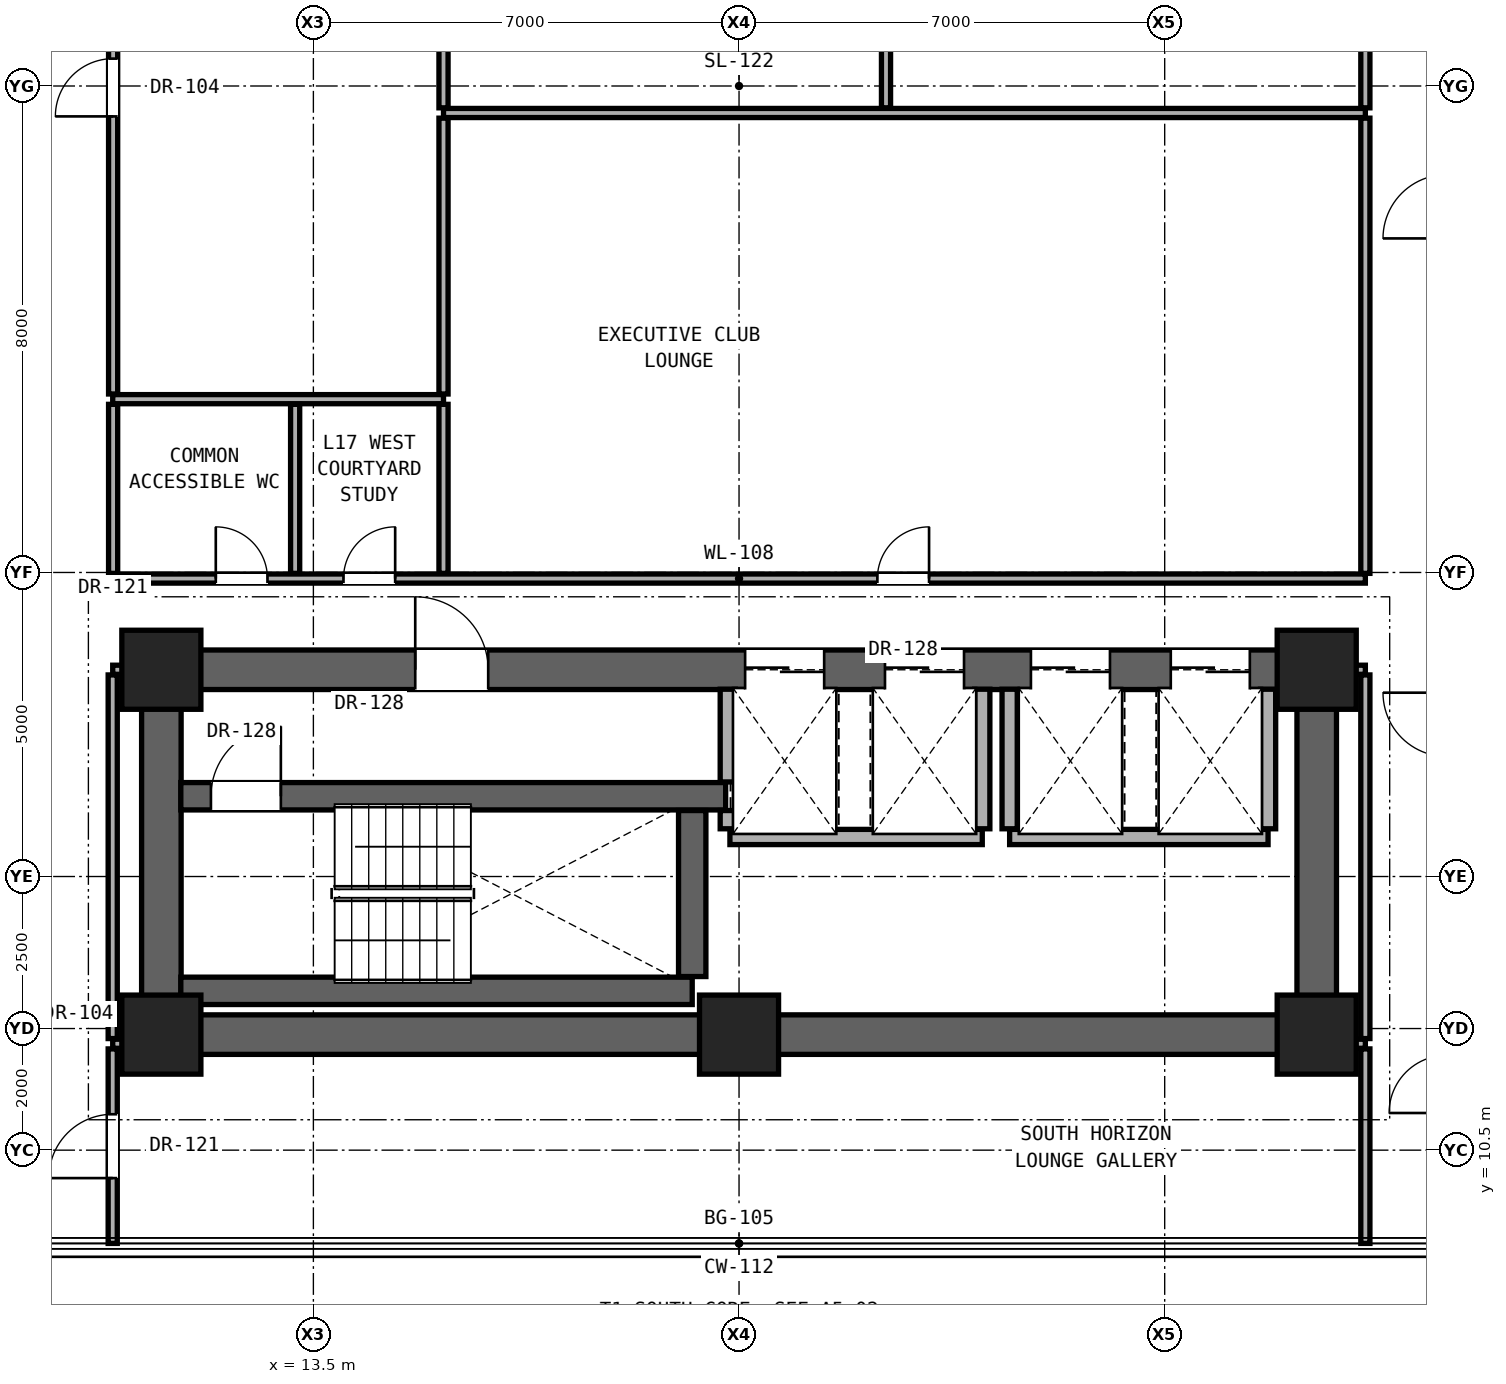
"""IFC4 building model, lengths in metres.
Left out: names, types, materials, properties, quantities, classifications, styles, units other than length and angle.
Written with IfcOpenShell. Run it as: python <this file> out.ifc"""

import sys

from ifc_helpers import new_model, si_unit, direction, frame, frame_2d, origin, origin_2d, place, context, subcontext, project, spatial, rectangle, extrude, element, fill, save


model = new_model("IFC4")
c1 = context("Model", 3, precision=1e-05, world=origin(), true_north=direction((0.0, 1.0)))
c2 = subcontext(c1, "Body", "Model", "MODEL_VIEW")
j1 = project(units=[si_unit("LENGTHUNIT", "METRE"), si_unit("PLANEANGLEUNIT", "RADIAN")], contexts=[c1])
p1 = place(None, origin())
s1 = spatial("IfcSite", under=j1, at=p1, CompositionType="ELEMENT")
p2 = place(p1, origin())
s2 = spatial("IfcBuilding", under=s1, at=p2, CompositionType="ELEMENT")
p3 = place(p2, frame((0.0, 0.0, 62.0)))
s3 = spatial("IfcBuildingStorey", under=s2, at=p3, CompositionType="ELEMENT", Elevation=62.0)
for number, where, z_axis, x_axis in (
    (1, (11.0, 12.4, 0.0), (0.0, 0.0, 1.0), (1.0, 0.0, 0.0)),
    (2, (20.5, 12.4, 0.0), (0.0, 0.0, 1.0), (1.0, 0.0, 0.0)),
    (3, (30.0, 12.4, 0.0), (0.0, 0.0, 1.0), (1.0, 0.0, 0.0)),
    (4, (11.0, 18.4, 0.0), (0.0, 0.0, 1.0), (1.0, 0.0, 0.0)),
    (5, (30.0, 18.4, 0.0), (0.0, 0.0, 1.0), (1.0, 0.0, 0.0)),
):
    element("IfcColumn", number, at=place(p3, frame(where, z_axis=z_axis, x_axis=x_axis)), inside=s3, PredefinedType="COLUMN", context=c2, shape_type="SweptSolid", body=[
        extrude(rectangle(XDim=1.3, YDim=1.3, at=origin_2d()), origin(), (0.0, 0.0, 1.0), 3.3),
    ])
p4 = place(p3, frame((11.0, 12.4, 0.0), z_axis=(0.0, 0.0, 1.0), x_axis=(1.0, 0.0, 0.0)))
e6 = element("IfcWall", 6, at=p4, inside=s3, PredefinedType="SHEAR", context=c2, shape_type="SweptSolid", body=[
    extrude(rectangle(XDim=19.0, YDim=0.65, at=frame_2d((9.5, 0.0))), origin(), (0.0, 0.0, 1.0), 3.06),
])
for number, where, z_axis, x_axis in (
    (7, (11.0, 12.4, 0.0), (0.0, 0.0, 1.0), (0.0, 1.0, 0.0)),
    (8, (30.0, 12.4, 0.0), (0.0, 0.0, 1.0), (0.0, 1.0, 0.0)),
):
    element("IfcWall", number, at=place(p3, frame(where, z_axis=z_axis, x_axis=x_axis)), inside=s3, PredefinedType="SHEAR", context=c2, shape_type="SweptSolid", body=[
        extrude(rectangle(XDim=6.0, YDim=0.65, at=frame_2d((3.0, 0.0))), origin(), (0.0, 0.0, 1.0), 3.06),
    ])
p5 = place(p3, frame((11.0, 18.4, 0.0), z_axis=(0.0, 0.0, 1.0), x_axis=(1.0, 0.0, 0.0)))
e9 = element("IfcWall", 9, at=p5, inside=s3, PredefinedType="SHEAR", context=c2, shape_type="SweptSolid", body=[
    extrude(rectangle(XDim=19.0, YDim=0.65, at=frame_2d((9.5, 0.0))), origin(), (0.0, 0.0, 1.0), 3.06),
])
p6 = place(p5, frame((4.175, 0.0, 0.0)))
e10 = element("IfcOpeningElement", 10, at=p6, cuts=e9, PredefinedType="OPENING", context=c2, shape_type="SweptSolid", body=[
    extrude(rectangle(XDim=1.2, YDim=2.25, at=frame_2d((0.6, 1.125))), frame((0.0, 0.335, 0.0), z_axis=(0.0, -1.0, 0.0), x_axis=(1.0, 0.0, 0.0)), (0.0, 0.0, 1.0), 0.67),
])
p7 = place(p5, frame((9.6, 0.0, 0.0)))
e11 = element("IfcOpeningElement", 11, at=p7, cuts=e9, PredefinedType="OPENING", context=c2, shape_type="SweptSolid", body=[
    extrude(rectangle(XDim=1.3, YDim=2.3, at=frame_2d((0.65, 1.15))), frame((0.0, 0.335, 0.0), z_axis=(0.0, -1.0, 0.0), x_axis=(1.0, 0.0, 0.0)), (0.0, 0.0, 1.0), 0.67),
])
p8 = place(p5, frame((11.9, 0.0, 0.0)))
e12 = element("IfcOpeningElement", 12, at=p8, cuts=e9, PredefinedType="OPENING", context=c2, shape_type="SweptSolid", body=[
    extrude(rectangle(XDim=1.3, YDim=2.3, at=frame_2d((0.65, 1.15))), frame((0.0, 0.335, 0.0), z_axis=(0.0, -1.0, 0.0), x_axis=(1.0, 0.0, 0.0)), (0.0, 0.0, 1.0), 0.67),
])
p9 = place(p5, frame((14.3, 0.0, 0.0)))
e13 = element("IfcOpeningElement", 13, at=p9, cuts=e9, PredefinedType="OPENING", context=c2, shape_type="SweptSolid", body=[
    extrude(rectangle(XDim=1.3, YDim=2.3, at=frame_2d((0.65, 1.15))), frame((0.0, 0.335, 0.0), z_axis=(0.0, -1.0, 0.0), x_axis=(1.0, 0.0, 0.0)), (0.0, 0.0, 1.0), 0.67),
])
p10 = place(p5, frame((16.6, 0.0, 0.0)))
e14 = element("IfcOpeningElement", 14, at=p10, cuts=e9, PredefinedType="OPENING", context=c2, shape_type="SweptSolid", body=[
    extrude(rectangle(XDim=1.3, YDim=2.3, at=frame_2d((0.65, 1.15))), frame((0.0, 0.335, 0.0), z_axis=(0.0, -1.0, 0.0), x_axis=(1.0, 0.0, 0.0)), (0.0, 0.0, 1.0), 0.67),
])
for number, where, z_axis, x_axis in (
    (15, (10.2, 12.25, 0.0), (0.0, 0.0, 1.0), (1.0, 0.0, 0.0)),
    (16, (30.32, 12.25, 0.0), (0.0, 0.0, 1.0), (1.0, 0.0, 0.0)),
):
    element("IfcWall", number, at=place(p3, frame(where, z_axis=z_axis, x_axis=x_axis)), inside=s3, PredefinedType="PARTITIONING", context=c2, shape_type="SweptSolid", body=[
        extrude(rectangle(XDim=0.48, YDim=0.15, at=frame_2d((0.24, 0.0))), origin(), (0.0, 0.0, 1.0), 3.06),
    ])
p11 = place(p3, frame((11.32, 13.12, 0.0), z_axis=(0.0, 0.0, 1.0), x_axis=(1.0, 0.0, 0.0)))
e17 = element("IfcWall", 17, at=p11, inside=s3, PredefinedType="SHEAR", context=c2, shape_type="SweptSolid", body=[
    extrude(rectangle(XDim=8.41, YDim=0.45, at=frame_2d((4.205, 0.0))), origin(), (0.0, 0.0, 1.0), 3.06),
])
p12 = place(p3, frame((20.35, 15.65, 0.0), z_axis=(0.0, 0.0, 1.0), x_axis=(1.0, 0.0, 0.0)))
e18 = element("IfcWall", 18, at=p12, inside=s3, PredefinedType="SOLIDWALL", context=c2, shape_type="SweptSolid", body=[
    extrude(rectangle(XDim=4.15, YDim=0.25, at=frame_2d((2.075, 0.0))), origin(), (0.0, 0.0, 1.0), 3.06),
])
p13 = place(p3, frame((24.95, 15.65, 0.0), z_axis=(0.0, 0.0, 1.0), x_axis=(1.0, 0.0, 0.0)))
e19 = element("IfcWall", 19, at=p13, inside=s3, PredefinedType="SOLIDWALL", context=c2, shape_type="SweptSolid", body=[
    extrude(rectangle(XDim=4.25, YDim=0.25, at=frame_2d((2.125, 0.0))), origin(), (0.0, 0.0, 1.0), 3.06),
])
p14 = place(p3, frame((11.32, 16.32, 0.0), z_axis=(0.0, 0.0, 1.0), x_axis=(1.0, 0.0, 0.0)))
e20 = element("IfcWall", 20, at=p14, inside=s3, PredefinedType="SHEAR", context=c2, shape_type="SweptSolid", body=[
    extrude(rectangle(XDim=8.96, YDim=0.45, at=frame_2d((4.48, 0.0))), origin(), (0.0, 0.0, 1.0), 3.06),
])
p15 = place(p14, frame((0.495, 0.0, 0.0)))
e21 = element("IfcOpeningElement", 21, at=p15, cuts=e20, PredefinedType="OPENING", context=c2, shape_type="SweptSolid", body=[
    extrude(rectangle(XDim=1.15, YDim=2.2, at=frame_2d((0.575, 1.1))), frame((0.0, 0.235, 0.0), z_axis=(0.0, -1.0, 0.0), x_axis=(1.0, 0.0, 0.0)), (0.0, 0.0, 1.0), 0.47),
])
for number, where, z_axis, x_axis in (
    (22, (10.2, 18.4, 0.0), (0.0, 0.0, 1.0), (1.0, 0.0, 0.0)),
    (23, (30.32, 18.4, 0.0), (0.0, 0.0, 1.0), (1.0, 0.0, 0.0)),
):
    element("IfcWall", number, at=place(p3, frame(where, z_axis=z_axis, x_axis=x_axis)), inside=s3, PredefinedType="PARTITIONING", context=c2, shape_type="SweptSolid", body=[
        extrude(rectangle(XDim=0.48, YDim=0.15, at=frame_2d((0.24, 0.0))), origin(), (0.0, 0.0, 1.0), 2.436),
    ])
p16 = place(p3, frame((10.2, 19.9, 0.0), z_axis=(0.0, 0.0, 1.0), x_axis=(1.0, 0.0, 0.0)))
e24 = element("IfcWall", 24, at=p16, inside=s3, PredefinedType="PARTITIONING", context=c2, shape_type="SweptSolid", body=[
    extrude(rectangle(XDim=20.6, YDim=0.15, at=frame_2d((10.3, 0.0))), origin(), (0.0, 0.0, 1.0), 2.104),
])
p17 = place(p16, frame((1.695, 0.0, 0.0)))
e25 = element("IfcOpeningElement", 25, at=p17, cuts=e24, PredefinedType="OPENING", context=c2, shape_type="SweptSolid", body=[
    extrude(rectangle(XDim=0.85, YDim=2.01, at=frame_2d((0.425, 1.005))), frame((0.0, 0.085, 0.0), z_axis=(0.0, -1.0, 0.0), x_axis=(1.0, 0.0, 0.0)), (0.0, 0.0, 1.0), 0.17),
])
p18 = place(p16, frame((3.795, 0.0, 0.0)))
e26 = element("IfcOpeningElement", 26, at=p18, cuts=e24, PredefinedType="OPENING", context=c2, shape_type="SweptSolid", body=[
    extrude(rectangle(XDim=0.85, YDim=2.01, at=frame_2d((0.425, 1.005))), frame((0.0, 0.085, 0.0), z_axis=(0.0, -1.0, 0.0), x_axis=(1.0, 0.0, 0.0)), (0.0, 0.0, 1.0), 0.17),
])
p19 = place(p16, frame((12.575, 0.0, 0.0)))
e27 = element("IfcOpeningElement", 27, at=p19, cuts=e24, PredefinedType="OPENING", context=c2, shape_type="SweptSolid", body=[
    extrude(rectangle(XDim=0.85, YDim=2.01, at=frame_2d((0.425, 1.005))), frame((0.0, 0.085, 0.0), z_axis=(0.0, -1.0, 0.0), x_axis=(1.0, 0.0, 0.0)), (0.0, 0.0, 1.0), 0.17),
])
p20 = place(p3, frame((10.2, 22.85, 0.0), z_axis=(0.0, 0.0, 1.0), x_axis=(1.0, 0.0, 0.0)))
e28 = element("IfcWall", 28, at=p20, inside=s3, PredefinedType="PARTITIONING", context=c2, shape_type="SweptSolid", body=[
    extrude(rectangle(XDim=5.44, YDim=0.15, at=frame_2d((2.72, 0.0))), origin(), (0.0, 0.0, 1.0), 2.104),
])
p21 = place(p3, frame((15.64, 27.556, 0.0), z_axis=(0.0, 0.0, 1.0), x_axis=(1.0, 0.0, 0.0)))
e29 = element("IfcWall", 29, at=p21, inside=s3, PredefinedType="PARTITIONING", context=c2, shape_type="SweptSolid", body=[
    extrude(rectangle(XDim=15.16, YDim=0.15, at=frame_2d((7.58, 0.0))), origin(), (0.0, 0.0, 1.0), 2.104),
])
p22 = place(p3, frame((10.2, 8.966, 0.0), z_axis=(0.0, 0.0, 1.0), x_axis=(0.0, 1.0, 0.0)))
e30 = element("IfcWall", 30, at=p22, inside=s3, PredefinedType="PARTITIONING", context=c2, shape_type="SweptSolid", body=[
    extrude(rectangle(XDim=3.199, YDim=0.15, at=frame_2d((1.6, 0.0))), origin(), (0.0, 0.0, 1.0), 3.06),
])
p23 = place(p22, frame((1.074, 0.0, 0.0)))
e31 = element("IfcOpeningElement", 31, at=p23, cuts=e30, PredefinedType="OPENING", context=c2, shape_type="SweptSolid", body=[
    extrude(rectangle(XDim=1.05, YDim=2.2, at=frame_2d((0.525, 1.1))), frame((0.0, 0.085, 0.0), z_axis=(0.0, -1.0, 0.0), x_axis=(1.0, 0.0, 0.0)), (0.0, 0.0, 1.0), 0.17),
])
p24 = place(p3, frame((10.2, 12.335, 0.0), z_axis=(0.0, 0.0, 1.0), x_axis=(0.0, 1.0, 0.0)))
e32 = element("IfcWall", 32, at=p24, inside=s3, PredefinedType="PARTITIONING", context=c2, shape_type="SweptSolid", body=[
    extrude(rectangle(XDim=5.98, YDim=0.15, at=frame_2d((2.99, 0.0))), origin(), (0.0, 0.0, 1.0), 2.436),
])
p25 = place(p3, frame((10.207, 19.985, 0.0), z_axis=(0.0, 0.0, 1.0), x_axis=(0.0, 1.0, 0.0)))
e33 = element("IfcWall", 33, at=p25, inside=s3, PredefinedType="PARTITIONING", context=c2, shape_type="SweptSolid", body=[
    extrude(rectangle(XDim=2.78, YDim=0.15, at=frame_2d((1.39, 0.0))), origin(), (0.0, 0.0, 1.0), 3.06),
])
p26 = place(p3, frame((10.207, 22.935, 0.0), z_axis=(0.0, 0.0, 1.0), x_axis=(0.0, 1.0, 0.0)))
e34 = element("IfcWall", 34, at=p26, inside=s3, PredefinedType="PARTITIONING", context=c2, shape_type="SweptSolid", body=[
    extrude(rectangle(XDim=10.08, YDim=0.15, at=frame_2d((5.04, 0.0))), origin(), (0.0, 0.0, 1.0), 2.279),
])
p27 = place(p26, frame((4.565, 0.0, 0.0)))
e35 = element("IfcOpeningElement", 35, at=p27, cuts=e34, PredefinedType="OPENING", context=c2, shape_type="SweptSolid", body=[
    extrude(rectangle(XDim=0.95, YDim=2.15, at=frame_2d((0.475, 1.075))), frame((0.0, 0.085, 0.0), z_axis=(0.0, -1.0, 0.0), x_axis=(1.0, 0.0, 0.0)), (0.0, 0.0, 1.0), 0.17),
])
p28 = place(p3, frame((13.2, 19.985, 0.0), z_axis=(0.0, 0.0, 1.0), x_axis=(0.0, 1.0, 0.0)))
e36 = element("IfcWall", 36, at=p28, inside=s3, PredefinedType="PARTITIONING", context=c2, shape_type="SweptSolid", body=[
    extrude(rectangle(XDim=2.78, YDim=0.15, at=frame_2d((1.39, 0.0))), origin(), (0.0, 0.0, 1.0), 3.06),
])
p29 = place(p3, frame((15.64, 19.985, 0.0), z_axis=(0.0, 0.0, 1.0), x_axis=(0.0, 1.0, 0.0)))
e37 = element("IfcWall", 37, at=p29, inside=s3, PredefinedType="PARTITIONING", context=c2, shape_type="SweptSolid", body=[
    extrude(rectangle(XDim=2.78, YDim=0.15, at=frame_2d((1.39, 0.0))), origin(), (0.0, 0.0, 1.0), 2.589),
])
p30 = place(p3, frame((15.64, 22.935, 0.0), z_axis=(0.0, 0.0, 1.0), x_axis=(0.0, 1.0, 0.0)))
e38 = element("IfcWall", 38, at=p30, inside=s3, PredefinedType="PARTITIONING", context=c2, shape_type="SweptSolid", body=[
    extrude(rectangle(XDim=4.536, YDim=0.15, at=frame_2d((2.268, 0.0))), origin(), (0.0, 0.0, 1.0), 2.104),
])
p31 = place(p3, frame((15.64, 27.641, 0.0), z_axis=(0.0, 0.0, 1.0), x_axis=(0.0, 1.0, 0.0)))
e39 = element("IfcWall", 39, at=p31, inside=s3, PredefinedType="PARTITIONING", context=c2, shape_type="SweptSolid", body=[
    extrude(rectangle(XDim=5.374, YDim=0.15, at=frame_2d((2.687, 0.0))), origin(), (0.0, 0.0, 1.0), 2.104),
])
p32 = place(p3, frame((19.73, 13.355, 0.0), z_axis=(0.0, 0.0, 1.0), x_axis=(0.0, 1.0, 0.0)))
e40 = element("IfcWall", 40, at=p32, inside=s3, PredefinedType="SHEAR", context=c2, shape_type="SweptSolid", body=[
    extrude(rectangle(XDim=2.73, YDim=0.45, at=frame_2d((1.365, 0.0))), origin(), (0.0, 0.0, 1.0), 3.06),
])
p33 = place(p3, frame((20.315, 15.785, 0.0), z_axis=(0.0, 0.0, 1.0), x_axis=(0.0, 1.0, 0.0)))
e41 = element("IfcWall", 41, at=p33, inside=s3, PredefinedType="SOLIDWALL", context=c2, shape_type="SweptSolid", body=[
    extrude(rectangle(XDim=0.3, YDim=0.25, at=frame_2d((0.15, 0.0))), origin(), (0.0, 0.0, 1.0), 3.06),
])
p34 = place(p3, frame((20.315, 16.555, 0.0), z_axis=(0.0, 0.0, 1.0), x_axis=(0.0, 1.0, 0.0)))
e42 = element("IfcWall", 42, at=p34, inside=s3, PredefinedType="SOLIDWALL", context=c2, shape_type="SweptSolid", body=[
    extrude(rectangle(XDim=1.525, YDim=0.25, at=frame_2d((0.763, 0.0))), origin(), (0.0, 0.0, 1.0), 3.06),
])
p35 = place(p3, frame((22.917, 27.641, 0.0), z_axis=(0.0, 0.0, 1.0), x_axis=(0.0, 1.0, 0.0)))
e43 = element("IfcWall", 43, at=p35, inside=s3, PredefinedType="PARTITIONING", context=c2, shape_type="SweptSolid", body=[
    extrude(rectangle(XDim=5.374, YDim=0.15, at=frame_2d((2.687, 0.0))), origin(), (0.0, 0.0, 1.0), 2.104),
])
for number, where, z_axis, x_axis in (
    (44, (24.5, 15.785, 0.0), (0.0, 0.0, 1.0), (0.0, 1.0, 0.0)),
    (45, (24.95, 15.785, 0.0), (0.0, 0.0, 1.0), (0.0, 1.0, 0.0)),
    (46, (29.2, 15.785, 0.0), (0.0, 0.0, 1.0), (0.0, 1.0, 0.0)),
):
    element("IfcWall", number, at=place(p3, frame(where, z_axis=z_axis, x_axis=x_axis)), inside=s3, PredefinedType="SOLIDWALL", context=c2, shape_type="SweptSolid", body=[
        extrude(rectangle(XDim=2.295, YDim=0.25, at=frame_2d((1.147, 0.0))), origin(), (0.0, 0.0, 1.0), 3.06),
    ])
p36 = place(p3, frame((30.8, 8.966, 0.0), z_axis=(0.0, 0.0, 1.0), x_axis=(0.0, 1.0, 0.0)))
e47 = element("IfcWall", 47, at=p36, inside=s3, PredefinedType="PARTITIONING", context=c2, shape_type="SweptSolid", body=[
    extrude(rectangle(XDim=3.199, YDim=0.15, at=frame_2d((1.6, 0.0))), origin(), (0.0, 0.0, 1.0), 3.06),
])
p37 = place(p3, frame((30.8, 12.335, 0.0), z_axis=(0.0, 0.0, 1.0), x_axis=(0.0, 1.0, 0.0)))
e48 = element("IfcWall", 48, at=p37, inside=s3, PredefinedType="PARTITIONING", context=c2, shape_type="SweptSolid", body=[
    extrude(rectangle(XDim=5.98, YDim=0.15, at=frame_2d((2.99, 0.0))), origin(), (0.0, 0.0, 1.0), 2.436),
])
p38 = place(p3, frame((30.8, 19.985, 0.0), z_axis=(0.0, 0.0, 1.0), x_axis=(0.0, 1.0, 0.0)))
e49 = element("IfcWall", 49, at=p38, inside=s3, PredefinedType="PARTITIONING", context=c2, shape_type="SweptSolid", body=[
    extrude(rectangle(XDim=7.486, YDim=0.15, at=frame_2d((3.743, 0.0))), origin(), (0.0, 0.0, 1.0), 2.279),
])
p39 = place(p3, frame((30.8, 27.641, 0.0), z_axis=(0.0, 0.0, 1.0), x_axis=(0.0, 1.0, 0.0)))
e50 = element("IfcWall", 50, at=p39, inside=s3, PredefinedType="PARTITIONING", context=c2, shape_type="SweptSolid", body=[
    extrude(rectangle(XDim=5.374, YDim=0.15, at=frame_2d((2.687, 0.0))), origin(), (0.0, 0.0, 1.0), 2.279),
])
p40 = place(p6, origin())
e51 = element("IfcDoor", 51, at=p40, inside=s3, OperationType="SINGLE_SWING_LEFT", PredefinedType="DOOR", context=c2, shape_type="SweptSolid", body=[
    extrude(rectangle(XDim=1.2, YDim=2.25, at=frame_2d((0.6, 1.125))), frame((0.0, 0.025, 0.0), z_axis=(0.0, -1.0, 0.0), x_axis=(1.0, 0.0, 0.0)), (0.0, 0.0, 1.0), 0.05),
])
fill(e10, e51)
p41 = place(p15, origin())
e52 = element("IfcDoor", 52, at=p41, inside=s3, OperationType="SINGLE_SWING_RIGHT", PredefinedType="DOOR", context=c2, shape_type="SweptSolid", body=[
    extrude(rectangle(XDim=1.15, YDim=2.2, at=frame_2d((0.575, 1.1))), frame((0.0, 0.025, 0.0), z_axis=(0.0, -1.0, 0.0), x_axis=(1.0, 0.0, 0.0)), (0.0, 0.0, 1.0), 0.05),
])
fill(e21, e52)
p42 = place(p17, origin())
e53 = element("IfcDoor", 53, at=p42, inside=s3, OperationType="SINGLE_SWING_LEFT", PredefinedType="DOOR", context=c2, shape_type="SweptSolid", body=[
    extrude(rectangle(XDim=0.85, YDim=2.01, at=frame_2d((0.425, 1.005))), frame((0.0, 0.025, 0.0), z_axis=(0.0, -1.0, 0.0), x_axis=(1.0, 0.0, 0.0)), (0.0, 0.0, 1.0), 0.05),
])
fill(e25, e53)
p43 = place(p18, origin())
e54 = element("IfcDoor", 54, at=p43, inside=s3, OperationType="SINGLE_SWING_RIGHT", PredefinedType="DOOR", context=c2, shape_type="SweptSolid", body=[
    extrude(rectangle(XDim=0.85, YDim=2.01, at=frame_2d((0.425, 1.005))), frame((0.0, 0.025, 0.0), z_axis=(0.0, -1.0, 0.0), x_axis=(1.0, 0.0, 0.0)), (0.0, 0.0, 1.0), 0.05),
])
fill(e26, e54)
p44 = place(p27, origin())
e55 = element("IfcDoor", 55, at=p44, inside=s3, OperationType="SINGLE_SWING_LEFT", PredefinedType="DOOR", context=c2, shape_type="SweptSolid", body=[
    extrude(rectangle(XDim=0.95, YDim=2.15, at=frame_2d((0.475, 1.075))), frame((0.0, 0.025, 0.0), z_axis=(0.0, -1.0, 0.0), x_axis=(1.0, 0.0, 0.0)), (0.0, 0.0, 1.0), 0.05),
])
fill(e35, e55)
p45 = place(p19, origin())
e56 = element("IfcDoor", 56, at=p45, inside=s3, OperationType="SINGLE_SWING_RIGHT", PredefinedType="DOOR", context=c2, shape_type="SweptSolid", body=[
    extrude(rectangle(XDim=0.85, YDim=2.01, at=frame_2d((0.425, 1.005))), frame((0.0, 0.025, 0.0), z_axis=(0.0, -1.0, 0.0), x_axis=(1.0, 0.0, 0.0)), (0.0, 0.0, 1.0), 0.05),
])
fill(e27, e56)
p46 = place(p23, origin())
e57 = element("IfcDoor", 57, at=p46, inside=s3, OperationType="SINGLE_SWING_LEFT", PredefinedType="DOOR", context=c2, shape_type="SweptSolid", body=[
    extrude(rectangle(XDim=1.05, YDim=2.2, at=frame_2d((0.525, 1.1))), frame((0.0, 0.025, 0.0), z_axis=(0.0, -1.0, 0.0), x_axis=(1.0, 0.0, 0.0)), (0.0, 0.0, 1.0), 0.05),
])
fill(e31, e57)
p47 = place(p7, origin())
e58 = element("IfcDoor", 58, at=p47, inside=s3, OperationType="DOUBLE_DOOR_SLIDING", PredefinedType="DOOR", context=c2, shape_type="SweptSolid", body=[
    extrude(rectangle(XDim=1.3, YDim=2.3, at=frame_2d((0.65, 1.15))), frame((0.0, 0.025, 0.0), z_axis=(0.0, -1.0, 0.0), x_axis=(1.0, 0.0, 0.0)), (0.0, 0.0, 1.0), 0.05),
])
fill(e11, e58)
p48 = place(p8, origin())
e59 = element("IfcDoor", 59, at=p48, inside=s3, OperationType="DOUBLE_DOOR_SLIDING", PredefinedType="DOOR", context=c2, shape_type="SweptSolid", body=[
    extrude(rectangle(XDim=1.3, YDim=2.3, at=frame_2d((0.65, 1.15))), frame((0.0, 0.025, 0.0), z_axis=(0.0, -1.0, 0.0), x_axis=(1.0, 0.0, 0.0)), (0.0, 0.0, 1.0), 0.05),
])
fill(e12, e59)
p49 = place(p9, origin())
e60 = element("IfcDoor", 60, at=p49, inside=s3, OperationType="DOUBLE_DOOR_SLIDING", PredefinedType="DOOR", context=c2, shape_type="SweptSolid", body=[
    extrude(rectangle(XDim=1.3, YDim=2.3, at=frame_2d((0.65, 1.15))), frame((0.0, 0.025, 0.0), z_axis=(0.0, -1.0, 0.0), x_axis=(1.0, 0.0, 0.0)), (0.0, 0.0, 1.0), 0.05),
])
fill(e13, e60)
p50 = place(p10, origin())
e61 = element("IfcDoor", 61, at=p50, inside=s3, OperationType="DOUBLE_DOOR_SLIDING", PredefinedType="DOOR", context=c2, shape_type="SweptSolid", body=[
    extrude(rectangle(XDim=1.3, YDim=2.3, at=frame_2d((0.65, 1.15))), frame((0.0, 0.025, 0.0), z_axis=(0.0, -1.0, 0.0), x_axis=(1.0, 0.0, 0.0)), (0.0, 0.0, 1.0), 0.05),
])
fill(e14, e61)
save(model, sys.argv[1])
